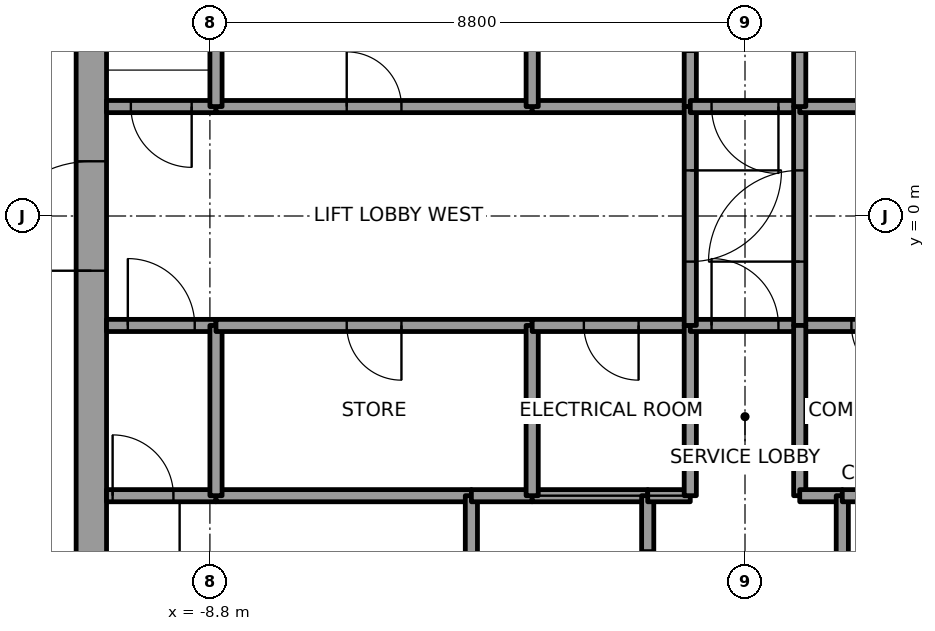
"""IFC4 building model, lengths in metres.
Left out: names, types, materials, properties, quantities, classifications, styles, units other than length and angle.
Written with IfcOpenShell. Run it as: python <this file> out.ifc"""

import sys

from ifc_helpers import new_model, si_unit, direction, frame, frame_2d, origin, place, context, subcontext, project, spatial, rectangle, extrude, element, fill, save


model = new_model("IFC4")
c1 = context("Model", 3, precision=1e-05, world=origin(), true_north=direction((0.0, 1.0)))
c2 = subcontext(c1, "Body", "Model", "MODEL_VIEW")
j1 = project(units=[si_unit("LENGTHUNIT", "METRE"), si_unit("PLANEANGLEUNIT", "RADIAN")], contexts=[c1])
p1 = place(None, origin())
s1 = spatial("IfcSite", under=j1, at=p1, CompositionType="ELEMENT")
p2 = place(p1, origin())
s2 = spatial("IfcBuilding", under=s1, at=p2, CompositionType="ELEMENT")
p3 = place(p2, frame((0.0, 0.0, 355.6)))
s3 = spatial("IfcBuildingStorey", under=s2, at=p3, CompositionType="ELEMENT", Elevation=355.6)
p4 = place(p3, frame((-10.75, -7.5, 0.0), z_axis=(0.0, 0.0, 1.0), x_axis=(0.0, 1.0, 0.0)))
e1 = element("IfcWall", 1, at=p4, inside=s3, PredefinedType="SHEAR", context=c2, shape_type="SweptSolid", body=[
    extrude(rectangle(XDim=15.0, YDim=0.5, at=frame_2d((7.5, 0.0))), origin(), (0.0, 0.0, 1.0), 5.4),
])
p5 = place(p4, frame((6.6, 0.0, 0.0)))
e2 = element("IfcOpeningElement", 2, at=p5, cuts=e1, PredefinedType="OPENING", context=c2, shape_type="SweptSolid", body=[
    extrude(rectangle(XDim=1.8, YDim=2.1, at=frame_2d((0.9, 1.05))), frame((0.0, 0.25, 0.0), z_axis=(0.0, -1.0, 0.0), x_axis=(1.0, 0.0, 0.0)), (0.0, 0.0, 1.0), 0.5),
])
p6 = place(p3, frame((-10.5, -4.6, 0.0), z_axis=(0.0, 0.0, 1.0), x_axis=(1.0, 0.0, 0.0)))
e3 = element("IfcWall", 3, at=p6, inside=s3, PredefinedType="SOLIDWALL", context=c2, shape_type="SweptSolid", body=[
    extrude(rectangle(XDim=1.8, YDim=0.2, at=frame_2d((0.9, 0.0))), origin(), (0.0, 0.0, 1.0), 5.25),
])
p7 = place(p6, frame((0.1, 0.0, 0.0)))
e4 = element("IfcOpeningElement", 4, at=p7, cuts=e3, PredefinedType="OPENING", context=c2, shape_type="SweptSolid", body=[
    extrude(rectangle(XDim=1.0, YDim=2.1, at=frame_2d((0.5, 1.05))), frame((0.0, 0.1, 0.0), z_axis=(0.0, -1.0, 0.0), x_axis=(1.0, 0.0, 0.0)), (0.0, 0.0, 1.0), 0.2),
])
p8 = place(p3, frame((-10.5, -1.8, 0.0), z_axis=(0.0, 0.0, 1.0), x_axis=(1.0, 0.0, 0.0)))
e5 = element("IfcWall", 5, at=p8, inside=s3, PredefinedType="SOLIDWALL", context=c2, shape_type="SweptSolid", body=[
    extrude(rectangle(XDim=1.8, YDim=0.2, at=frame_2d((0.9, 0.0))), origin(), (0.0, 0.0, 1.0), 5.25),
])
p9 = place(p8, frame((0.35, 0.0, 0.0)))
e6 = element("IfcOpeningElement", 6, at=p9, cuts=e5, PredefinedType="OPENING", context=c2, shape_type="SweptSolid", body=[
    extrude(rectangle(XDim=1.1, YDim=2.1, at=frame_2d((0.55, 1.05))), frame((0.0, 0.1, 0.0), z_axis=(0.0, -1.0, 0.0), x_axis=(1.0, 0.0, 0.0)), (0.0, 0.0, 1.0), 0.2),
])
p10 = place(p3, frame((-8.7, 1.8, 0.0), z_axis=(0.0, 0.0, 1.0), x_axis=(-1.0, 0.0, 0.0)))
e7 = element("IfcWall", 7, at=p10, inside=s3, PredefinedType="SOLIDWALL", context=c2, shape_type="SweptSolid", body=[
    extrude(rectangle(XDim=1.8, YDim=0.2, at=frame_2d((0.9, 0.0))), origin(), (0.0, 0.0, 1.0), 5.25),
])
p11 = place(p10, frame((0.4, 0.0, 0.0)))
e8 = element("IfcOpeningElement", 8, at=p11, cuts=e7, PredefinedType="OPENING", context=c2, shape_type="SweptSolid", body=[
    extrude(rectangle(XDim=1.0, YDim=2.1, at=frame_2d((0.5, 1.05))), frame((0.0, 0.1, 0.0), z_axis=(0.0, -1.0, 0.0), x_axis=(1.0, 0.0, 0.0)), (0.0, 0.0, 1.0), 0.2),
])
p12 = place(p3, frame((-8.7, -4.6, 0.0), z_axis=(0.0, 0.0, 1.0), x_axis=(1.0, 0.0, 0.0)))
e9 = element("IfcWall", 9, at=p12, inside=s3, PredefinedType="SOLIDWALL", context=c2, shape_type="SweptSolid", body=[
    extrude(rectangle(XDim=4.2, YDim=0.2, at=frame_2d((2.1, 0.0))), origin(), (0.0, 0.0, 1.0), 5.25),
])
p13 = place(p3, frame((-8.7, -1.8, 0.0), z_axis=(0.0, 0.0, 1.0), x_axis=(0.0, -1.0, 0.0)))
e10 = element("IfcWall", 10, at=p13, inside=s3, PredefinedType="SOLIDWALL", context=c2, shape_type="SweptSolid", body=[
    extrude(rectangle(XDim=2.8, YDim=0.2, at=frame_2d((1.4, 0.0))), origin(), (0.0, 0.0, 1.0), 5.25),
])
p14 = place(p3, frame((-3.5, -1.8, 0.0), z_axis=(0.0, 0.0, 1.0), x_axis=(-1.0, 0.0, 0.0)))
e11 = element("IfcWall", 11, at=p14, inside=s3, PredefinedType="SOLIDWALL", context=c2, shape_type="SweptSolid", body=[
    extrude(rectangle(XDim=5.2, YDim=0.2, at=frame_2d((2.6, 0.0))), origin(), (0.0, 0.0, 1.0), 5.25),
])
p15 = place(p14, frame((2.15, 0.0, 0.0)))
e12 = element("IfcOpeningElement", 12, at=p15, cuts=e11, PredefinedType="OPENING", context=c2, shape_type="SweptSolid", body=[
    extrude(rectangle(XDim=0.9, YDim=2.1, at=frame_2d((0.45, 1.05))), frame((0.0, 0.1, 0.0), z_axis=(0.0, -1.0, 0.0), x_axis=(1.0, 0.0, 0.0)), (0.0, 0.0, 1.0), 0.2),
])
p16 = place(p3, frame((-8.7, 1.8, 0.0), z_axis=(0.0, 0.0, 1.0), x_axis=(1.0, 0.0, 0.0)))
e13 = element("IfcWall", 13, at=p16, inside=s3, PredefinedType="SOLIDWALL", context=c2, shape_type="SweptSolid", body=[
    extrude(rectangle(XDim=5.2, YDim=0.2, at=frame_2d((2.6, 0.0))), origin(), (0.0, 0.0, 1.0), 5.25),
])
p17 = place(p16, frame((2.15, 0.0, 0.0)))
e14 = element("IfcOpeningElement", 14, at=p17, cuts=e13, PredefinedType="OPENING", context=c2, shape_type="SweptSolid", body=[
    extrude(rectangle(XDim=0.9, YDim=2.1, at=frame_2d((0.45, 1.05))), frame((0.0, 0.1, 0.0), z_axis=(0.0, -1.0, 0.0), x_axis=(1.0, 0.0, 0.0)), (0.0, 0.0, 1.0), 0.2),
])
p18 = place(p3, frame((-8.7, 4.6, 0.0), z_axis=(0.0, 0.0, 1.0), x_axis=(0.0, -1.0, 0.0)))
e15 = element("IfcWall", 15, at=p18, inside=s3, PredefinedType="SOLIDWALL", context=c2, shape_type="SweptSolid", body=[
    extrude(rectangle(XDim=2.8, YDim=0.2, at=frame_2d((1.4, 0.0))), origin(), (0.0, 0.0, 1.0), 5.25),
])
p19 = place(p3, frame((-4.5, -4.6, 0.0), z_axis=(0.0, 0.0, 1.0), x_axis=(0.0, -1.0, 0.0)))
e16 = element("IfcWall", 16, at=p19, inside=s3, PredefinedType="SOLIDWALL", context=c2, shape_type="SweptSolid", body=[
    extrude(rectangle(XDim=2.9, YDim=0.2, at=frame_2d((1.45, 0.0))), origin(), (0.0, 0.0, 1.0), 5.25),
])
p20 = place(p3, frame((-4.5, -4.6, 0.0), z_axis=(0.0, 0.0, 1.0), x_axis=(1.0, 0.0, 0.0)))
e17 = element("IfcWall", 17, at=p20, inside=s3, PredefinedType="SOLIDWALL", context=c2, shape_type="SweptSolid", body=[
    extrude(rectangle(XDim=1.0, YDim=0.2, at=frame_2d((0.5, 0.0))), origin(), (0.0, 0.0, 1.0), 5.25),
])
p21 = place(p3, frame((-3.5, -4.6, 0.0), z_axis=(0.0, 0.0, 1.0), x_axis=(1.0, 0.0, 0.0)))
e18 = element("IfcWall", 18, at=p21, inside=s3, PredefinedType="SOLIDWALL", context=c2, shape_type="SweptSolid", body=[
    extrude(rectangle(XDim=1.9, YDim=0.2, at=frame_2d((0.95, 0.0))), origin(), (0.0, 0.0, 1.0), 5.25),
])
p22 = place(p3, frame((-3.5, -4.6, 0.0), z_axis=(0.0, 0.0, 1.0), x_axis=(0.0, 1.0, 0.0)))
e19 = element("IfcWall", 19, at=p22, inside=s3, PredefinedType="SOLIDWALL", context=c2, shape_type="SweptSolid", body=[
    extrude(rectangle(XDim=2.8, YDim=0.2, at=frame_2d((1.4, 0.0))), origin(), (0.0, 0.0, 1.0), 5.25),
])
p23 = place(p3, frame((-0.9, -1.8, 0.0), z_axis=(0.0, 0.0, 1.0), x_axis=(-1.0, 0.0, 0.0)))
e20 = element("IfcWall", 20, at=p23, inside=s3, PredefinedType="SOLIDWALL", context=c2, shape_type="SweptSolid", body=[
    extrude(rectangle(XDim=2.6, YDim=0.2, at=frame_2d((1.3, 0.0))), origin(), (0.0, 0.0, 1.0), 5.25),
])
p24 = place(p23, frame((0.85, 0.0, 0.0)))
e21 = element("IfcOpeningElement", 21, at=p24, cuts=e20, PredefinedType="OPENING", context=c2, shape_type="SweptSolid", body=[
    extrude(rectangle(XDim=0.9, YDim=2.1, at=frame_2d((0.45, 1.05))), frame((0.0, 0.1, 0.0), z_axis=(0.0, -1.0, 0.0), x_axis=(1.0, 0.0, 0.0)), (0.0, 0.0, 1.0), 0.2),
])
p25 = place(p3, frame((-0.9, 1.8, 0.0), z_axis=(0.0, 0.0, 1.0), x_axis=(-1.0, 0.0, 0.0)))
e22 = element("IfcWall", 22, at=p25, inside=s3, PredefinedType="SOLIDWALL", context=c2, shape_type="SweptSolid", body=[
    extrude(rectangle(XDim=2.6, YDim=0.2, at=frame_2d((1.3, 0.0))), origin(), (0.0, 0.0, 1.0), 5.25),
])
p26 = place(p3, frame((-3.5, 1.8, 0.0), z_axis=(0.0, 0.0, 1.0), x_axis=(0.0, 1.0, 0.0)))
e23 = element("IfcWall", 23, at=p26, inside=s3, PredefinedType="SOLIDWALL", context=c2, shape_type="SweptSolid", body=[
    extrude(rectangle(XDim=2.8, YDim=0.2, at=frame_2d((1.4, 0.0))), origin(), (0.0, 0.0, 1.0), 5.25),
])
p27 = place(p3, frame((-0.9, 1.8, 0.0), z_axis=(0.0, 0.0, 1.0), x_axis=(0.0, 1.0, 0.0)))
e24 = element("IfcWall", 24, at=p27, inside=s3, PredefinedType="SOLIDWALL", context=c2, shape_type="SweptSolid", body=[
    extrude(rectangle(XDim=3.0, YDim=0.2, at=frame_2d((1.5, 0.0))), origin(), (0.0, 0.0, 1.0), 5.25),
])
p28 = place(p27, frame((0.9, 0.0, 0.0)))
e25 = element("IfcOpeningElement", 25, at=p28, cuts=e24, PredefinedType="OPENING", context=c2, shape_type="SweptSolid", body=[
    extrude(rectangle(XDim=1.2, YDim=2.1, at=frame_2d((0.6, 1.05))), frame((0.0, 0.1, 0.0), z_axis=(0.0, -1.0, 0.0), x_axis=(1.0, 0.0, 0.0)), (0.0, 0.0, 1.0), 0.2),
])
p29 = place(p3, frame((-1.6, -7.5, 0.0), z_axis=(0.0, 0.0, 1.0), x_axis=(0.0, 1.0, 0.0)))
e26 = element("IfcWall", 26, at=p29, inside=s3, PredefinedType="SOLIDWALL", context=c2, shape_type="SweptSolid", body=[
    extrude(rectangle(XDim=2.9, YDim=0.2, at=frame_2d((1.45, 0.0))), origin(), (0.0, 0.0, 1.0), 5.25),
])
p30 = place(p29, frame((0.9, 0.0, 0.0)))
e27 = element("IfcOpeningElement", 27, at=p30, cuts=e26, PredefinedType="OPENING", context=c2, shape_type="SweptSolid", body=[
    extrude(rectangle(XDim=1.1, YDim=2.1, at=frame_2d((0.55, 1.05))), frame((0.0, 0.1, 0.0), z_axis=(0.0, -1.0, 0.0), x_axis=(1.0, 0.0, 0.0)), (0.0, 0.0, 1.0), 0.2),
])
p31 = place(p3, frame((-1.6, -4.6, 0.0), z_axis=(0.0, 0.0, 1.0), x_axis=(1.0, 0.0, 0.0)))
e28 = element("IfcWall", 28, at=p31, inside=s3, PredefinedType="SOLIDWALL", context=c2, shape_type="SweptSolid", body=[
    extrude(rectangle(XDim=0.7, YDim=0.2, at=frame_2d((0.35, 0.0))), origin(), (0.0, 0.0, 1.0), 5.25),
])
p32 = place(p3, frame((-0.9, -4.6, 0.0), z_axis=(0.0, 0.0, 1.0), x_axis=(0.0, 1.0, 0.0)))
e29 = element("IfcWall", 29, at=p32, inside=s3, PredefinedType="SOLIDWALL", context=c2, shape_type="SweptSolid", body=[
    extrude(rectangle(XDim=2.8, YDim=0.2, at=frame_2d((1.4, 0.0))), origin(), (0.0, 0.0, 1.0), 5.25),
])
p33 = place(p3, frame((-0.9, -1.8, 0.0), z_axis=(0.0, 0.0, 1.0), x_axis=(1.0, 0.0, 0.0)))
e30 = element("IfcWall", 30, at=p33, inside=s3, PredefinedType="SOLIDWALL", context=c2, shape_type="SweptSolid", body=[
    extrude(rectangle(XDim=1.8, YDim=0.2, at=frame_2d((0.9, 0.0))), origin(), (0.0, 0.0, 1.0), 5.25),
])
p34 = place(p33, frame((0.35, 0.0, 0.0)))
e31 = element("IfcOpeningElement", 31, at=p34, cuts=e30, PredefinedType="OPENING", context=c2, shape_type="SweptSolid", body=[
    extrude(rectangle(XDim=1.1, YDim=2.1, at=frame_2d((0.55, 1.05))), frame((0.0, 0.1, 0.0), z_axis=(0.0, -1.0, 0.0), x_axis=(1.0, 0.0, 0.0)), (0.0, 0.0, 1.0), 0.2),
])
p35 = place(p3, frame((-0.9, 1.8, 0.0), z_axis=(0.0, 0.0, 1.0), x_axis=(0.0, -1.0, 0.0)))
e32 = element("IfcWall", 32, at=p35, inside=s3, PredefinedType="SOLIDWALL", context=c2, shape_type="SweptSolid", body=[
    extrude(rectangle(XDim=3.6, YDim=0.2, at=frame_2d((1.8, 0.0))), origin(), (0.0, 0.0, 1.0), 5.25),
])
p36 = place(p35, frame((1.05, 0.0, 0.0)))
e33 = element("IfcOpeningElement", 33, at=p36, cuts=e32, PredefinedType="OPENING", context=c2, shape_type="SweptSolid", body=[
    extrude(rectangle(XDim=1.5, YDim=2.1, at=frame_2d((0.75, 1.05))), frame((0.0, 0.1, 0.0), z_axis=(0.0, -1.0, 0.0), x_axis=(1.0, 0.0, 0.0)), (0.0, 0.0, 1.0), 0.2),
])
p37 = place(p3, frame((0.9, 1.8, 0.0), z_axis=(0.0, 0.0, 1.0), x_axis=(-1.0, 0.0, 0.0)))
e34 = element("IfcWall", 34, at=p37, inside=s3, PredefinedType="SOLIDWALL", context=c2, shape_type="SweptSolid", body=[
    extrude(rectangle(XDim=1.8, YDim=0.2, at=frame_2d((0.9, 0.0))), origin(), (0.0, 0.0, 1.0), 5.25),
])
p38 = place(p37, frame((0.35, 0.0, 0.0)))
e35 = element("IfcOpeningElement", 35, at=p38, cuts=e34, PredefinedType="OPENING", context=c2, shape_type="SweptSolid", body=[
    extrude(rectangle(XDim=1.1, YDim=2.1, at=frame_2d((0.55, 1.05))), frame((0.0, 0.1, 0.0), z_axis=(0.0, -1.0, 0.0), x_axis=(1.0, 0.0, 0.0)), (0.0, 0.0, 1.0), 0.2),
])
p39 = place(p3, frame((3.5, -1.8, 0.0), z_axis=(0.0, 0.0, 1.0), x_axis=(-1.0, 0.0, 0.0)))
e36 = element("IfcWall", 36, at=p39, inside=s3, PredefinedType="SOLIDWALL", context=c2, shape_type="SweptSolid", body=[
    extrude(rectangle(XDim=2.6, YDim=0.2, at=frame_2d((1.3, 0.0))), origin(), (0.0, 0.0, 1.0), 5.25),
])
p40 = place(p39, frame((0.85, 0.0, 0.0)))
e37 = element("IfcOpeningElement", 37, at=p40, cuts=e36, PredefinedType="OPENING", context=c2, shape_type="SweptSolid", body=[
    extrude(rectangle(XDim=0.9, YDim=2.1, at=frame_2d((0.45, 1.05))), frame((0.0, 0.1, 0.0), z_axis=(0.0, -1.0, 0.0), x_axis=(1.0, 0.0, 0.0)), (0.0, 0.0, 1.0), 0.2),
])
p41 = place(p3, frame((0.9, -1.8, 0.0), z_axis=(0.0, 0.0, 1.0), x_axis=(0.0, 1.0, 0.0)))
e38 = element("IfcWall", 38, at=p41, inside=s3, PredefinedType="SOLIDWALL", context=c2, shape_type="SweptSolid", body=[
    extrude(rectangle(XDim=3.6, YDim=0.2, at=frame_2d((1.8, 0.0))), origin(), (0.0, 0.0, 1.0), 5.25),
])
p42 = place(p41, frame((1.05, 0.0, 0.0)))
e39 = element("IfcOpeningElement", 39, at=p42, cuts=e38, PredefinedType="OPENING", context=c2, shape_type="SweptSolid", body=[
    extrude(rectangle(XDim=1.5, YDim=2.1, at=frame_2d((0.75, 1.05))), frame((0.0, 0.1, 0.0), z_axis=(0.0, -1.0, 0.0), x_axis=(1.0, 0.0, 0.0)), (0.0, 0.0, 1.0), 0.2),
])
p43 = place(p3, frame((0.9, -1.8, 0.0), z_axis=(0.0, 0.0, 1.0), x_axis=(0.0, -1.0, 0.0)))
e40 = element("IfcWall", 40, at=p43, inside=s3, PredefinedType="SOLIDWALL", context=c2, shape_type="SweptSolid", body=[
    extrude(rectangle(XDim=2.8, YDim=0.2, at=frame_2d((1.4, 0.0))), origin(), (0.0, 0.0, 1.0), 5.25),
])
p44 = place(p3, frame((0.9, -4.6, 0.0), z_axis=(0.0, 0.0, 1.0), x_axis=(1.0, 0.0, 0.0)))
e41 = element("IfcWall", 41, at=p44, inside=s3, PredefinedType="SOLIDWALL", context=c2, shape_type="SweptSolid", body=[
    extrude(rectangle(XDim=0.7, YDim=0.2, at=frame_2d((0.35, 0.0))), origin(), (0.0, 0.0, 1.0), 5.25),
])
p45 = place(p3, frame((3.5, 1.8, 0.0), z_axis=(0.0, 0.0, 1.0), x_axis=(-1.0, 0.0, 0.0)))
e42 = element("IfcWall", 42, at=p45, inside=s3, PredefinedType="SOLIDWALL", context=c2, shape_type="SweptSolid", body=[
    extrude(rectangle(XDim=2.6, YDim=0.2, at=frame_2d((1.3, 0.0))), origin(), (0.0, 0.0, 1.0), 5.25),
])
p46 = place(p3, frame((0.9, 4.8, 0.0), z_axis=(0.0, 0.0, 1.0), x_axis=(0.0, -1.0, 0.0)))
e43 = element("IfcWall", 43, at=p46, inside=s3, PredefinedType="SOLIDWALL", context=c2, shape_type="SweptSolid", body=[
    extrude(rectangle(XDim=3.0, YDim=0.2, at=frame_2d((1.5, 0.0))), origin(), (0.0, 0.0, 1.0), 5.25),
])
p47 = place(p46, frame((0.9, 0.0, 0.0)))
e44 = element("IfcOpeningElement", 44, at=p47, cuts=e43, PredefinedType="OPENING", context=c2, shape_type="SweptSolid", body=[
    extrude(rectangle(XDim=1.2, YDim=2.1, at=frame_2d((0.6, 1.05))), frame((0.0, 0.1, 0.0), z_axis=(0.0, -1.0, 0.0), x_axis=(1.0, 0.0, 0.0)), (0.0, 0.0, 1.0), 0.2),
])
p48 = place(p3, frame((1.6, -4.6, 0.0), z_axis=(0.0, 0.0, 1.0), x_axis=(0.0, -1.0, 0.0)))
e45 = element("IfcWall", 45, at=p48, inside=s3, PredefinedType="SOLIDWALL", context=c2, shape_type="SweptSolid", body=[
    extrude(rectangle(XDim=2.9, YDim=0.2, at=frame_2d((1.45, 0.0))), origin(), (0.0, 0.0, 1.0), 5.25),
])
p49 = place(p48, frame((1.0, 0.0, 0.0)))
e46 = element("IfcOpeningElement", 46, at=p49, cuts=e45, PredefinedType="OPENING", context=c2, shape_type="SweptSolid", body=[
    extrude(rectangle(XDim=0.9, YDim=2.1, at=frame_2d((0.45, 1.05))), frame((0.0, 0.1, 0.0), z_axis=(0.0, -1.0, 0.0), x_axis=(1.0, 0.0, 0.0)), (0.0, 0.0, 1.0), 0.2),
])
p50 = place(p3, frame((1.6, -4.6, 0.0), z_axis=(0.0, 0.0, 1.0), x_axis=(1.0, 0.0, 0.0)))
e47 = element("IfcWall", 47, at=p50, inside=s3, PredefinedType="SOLIDWALL", context=c2, shape_type="SweptSolid", body=[
    extrude(rectangle(XDim=1.9, YDim=0.2, at=frame_2d((0.95, 0.0))), origin(), (0.0, 0.0, 1.0), 5.25),
])
p51 = place(p36, origin())
e48 = element("IfcDoor", 48, at=p51, inside=s3, OperationType="DOUBLE_DOOR_SINGLE_SWING", PredefinedType="DOOR", context=c2, shape_type="SweptSolid", body=[
    extrude(rectangle(XDim=1.5, YDim=2.1, at=frame_2d((0.75, 1.05))), frame((0.0, 0.025, 0.0), z_axis=(0.0, -1.0, 0.0), x_axis=(1.0, 0.0, 0.0)), (0.0, 0.0, 1.0), 0.05),
])
fill(e33, e48)
p52 = place(p42, origin())
e49 = element("IfcDoor", 49, at=p52, inside=s3, OperationType="DOUBLE_DOOR_SINGLE_SWING", PredefinedType="DOOR", context=c2, shape_type="SweptSolid", body=[
    extrude(rectangle(XDim=1.5, YDim=2.1, at=frame_2d((0.75, 1.05))), frame((0.0, 0.025, 0.0), z_axis=(0.0, -1.0, 0.0), x_axis=(1.0, 0.0, 0.0)), (0.0, 0.0, 1.0), 0.05),
])
fill(e39, e49)
p53 = place(p9, origin())
e50 = element("IfcDoor", 50, at=p53, inside=s3, OperationType="SINGLE_SWING_RIGHT", PredefinedType="DOOR", context=c2, shape_type="SweptSolid", body=[
    extrude(rectangle(XDim=1.1, YDim=2.1, at=frame_2d((0.55, 1.05))), frame((0.0, 0.025, 0.0), z_axis=(0.0, -1.0, 0.0), x_axis=(1.0, 0.0, 0.0)), (0.0, 0.0, 1.0), 0.05),
])
fill(e6, e50)
p54 = place(p38, origin())
e51 = element("IfcDoor", 51, at=p54, inside=s3, OperationType="SINGLE_SWING_RIGHT", PredefinedType="DOOR", context=c2, shape_type="SweptSolid", body=[
    extrude(rectangle(XDim=1.1, YDim=2.1, at=frame_2d((0.55, 1.05))), frame((0.0, 0.025, 0.0), z_axis=(0.0, -1.0, 0.0), x_axis=(1.0, 0.0, 0.0)), (0.0, 0.0, 1.0), 0.05),
])
fill(e35, e51)
p55 = place(p34, origin())
e52 = element("IfcDoor", 52, at=p55, inside=s3, OperationType="SINGLE_SWING_RIGHT", PredefinedType="DOOR", context=c2, shape_type="SweptSolid", body=[
    extrude(rectangle(XDim=1.1, YDim=2.1, at=frame_2d((0.55, 1.05))), frame((0.0, 0.025, 0.0), z_axis=(0.0, -1.0, 0.0), x_axis=(1.0, 0.0, 0.0)), (0.0, 0.0, 1.0), 0.05),
])
fill(e31, e52)
p56 = place(p11, origin())
e53 = element("IfcDoor", 53, at=p56, inside=s3, OperationType="SINGLE_SWING_LEFT", PredefinedType="DOOR", context=c2, shape_type="SweptSolid", body=[
    extrude(rectangle(XDim=1.0, YDim=2.1, at=frame_2d((0.5, 1.05))), frame((0.0, 0.025, 0.0), z_axis=(0.0, -1.0, 0.0), x_axis=(1.0, 0.0, 0.0)), (0.0, 0.0, 1.0), 0.05),
])
fill(e8, e53)
p57 = place(p7, origin())
e54 = element("IfcDoor", 54, at=p57, inside=s3, OperationType="SINGLE_SWING_LEFT", PredefinedType="DOOR", context=c2, shape_type="SweptSolid", body=[
    extrude(rectangle(XDim=1.0, YDim=2.1, at=frame_2d((0.5, 1.05))), frame((0.0, 0.025, 0.0), z_axis=(0.0, -1.0, 0.0), x_axis=(1.0, 0.0, 0.0)), (0.0, 0.0, 1.0), 0.05),
])
fill(e4, e54)
p58 = place(p15, origin())
e55 = element("IfcDoor", 55, at=p58, inside=s3, OperationType="SINGLE_SWING_LEFT", PredefinedType="DOOR", context=c2, shape_type="SweptSolid", body=[
    extrude(rectangle(XDim=0.9, YDim=2.1, at=frame_2d((0.45, 1.05))), frame((0.0, 0.025, 0.0), z_axis=(0.0, -1.0, 0.0), x_axis=(1.0, 0.0, 0.0)), (0.0, 0.0, 1.0), 0.05),
])
fill(e12, e55)
p59 = place(p24, origin())
e56 = element("IfcDoor", 56, at=p59, inside=s3, OperationType="SINGLE_SWING_LEFT", PredefinedType="DOOR", context=c2, shape_type="SweptSolid", body=[
    extrude(rectangle(XDim=0.9, YDim=2.1, at=frame_2d((0.45, 1.05))), frame((0.0, 0.025, 0.0), z_axis=(0.0, -1.0, 0.0), x_axis=(1.0, 0.0, 0.0)), (0.0, 0.0, 1.0), 0.05),
])
fill(e21, e56)
p60 = place(p40, origin())
e57 = element("IfcDoor", 57, at=p60, inside=s3, OperationType="SINGLE_SWING_LEFT", PredefinedType="DOOR", context=c2, shape_type="SweptSolid", body=[
    extrude(rectangle(XDim=0.9, YDim=2.1, at=frame_2d((0.45, 1.05))), frame((0.0, 0.025, 0.0), z_axis=(0.0, -1.0, 0.0), x_axis=(1.0, 0.0, 0.0)), (0.0, 0.0, 1.0), 0.05),
])
fill(e37, e57)
p61 = place(p17, origin())
e58 = element("IfcDoor", 58, at=p61, inside=s3, OperationType="SINGLE_SWING_RIGHT", PredefinedType="DOOR", context=c2, shape_type="SweptSolid", body=[
    extrude(rectangle(XDim=0.9, YDim=2.1, at=frame_2d((0.45, 1.05))), frame((0.0, 0.025, 0.0), z_axis=(0.0, -1.0, 0.0), x_axis=(1.0, 0.0, 0.0)), (0.0, 0.0, 1.0), 0.05),
])
fill(e14, e58)
p62 = place(p5, origin())
e59 = element("IfcDoor", 59, at=p62, inside=s3, OperationType="DOUBLE_DOOR_SINGLE_SWING", PredefinedType="DOOR", context=c2, shape_type="SweptSolid", body=[
    extrude(rectangle(XDim=1.8, YDim=2.1, at=frame_2d((0.9, 1.05))), frame((0.0, 0.025, 0.0), z_axis=(0.0, -1.0, 0.0), x_axis=(1.0, 0.0, 0.0)), (0.0, 0.0, 1.0), 0.05),
])
fill(e2, e59)
save(model, sys.argv[1])
